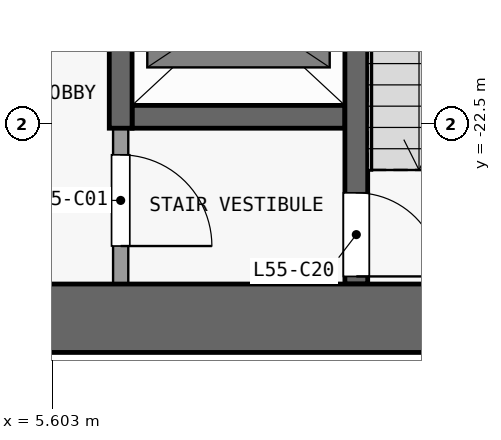
"""IFC4 building model, lengths in metres.
Left out: names, types, materials, properties, quantities, classifications, styles, units other than length and angle.
Written with IfcOpenShell. Run it as: python <this file> out.ifc"""

import sys

from ifc_helpers import new_model, si_unit, direction, frame, frame_2d, origin, place, context, subcontext, project, spatial, rectangle, extrude, element, fill, save


model = new_model("IFC4")
c1 = context("Model", 3, precision=1e-05, world=origin(), true_north=direction((0.0, 1.0)))
c2 = subcontext(c1, "Body", "Model", "MODEL_VIEW")
j1 = project(units=[si_unit("LENGTHUNIT", "METRE"), si_unit("PLANEANGLEUNIT", "RADIAN")], contexts=[c1])
p1 = place(None, origin())
s1 = spatial("IfcSite", under=j1, at=p1, CompositionType="ELEMENT")
p2 = place(p1, origin())
s2 = spatial("IfcBuilding", under=s1, at=p2, CompositionType="ELEMENT")
p3 = place(p2, frame((0.0, 0.0, 219.5)))
s3 = spatial("IfcBuildingStorey", under=s2, at=p3, CompositionType="ELEMENT", Elevation=219.5)
p4 = place(p3, frame((-13.2, -25.05, 0.0), z_axis=(0.0, 0.0, 1.0), x_axis=(1.0, 0.0, 0.0)))
e1 = element("IfcWall", 1, at=p4, inside=s3, PredefinedType="SHEAR", context=c2, shape_type="SweptSolid", body=[
    extrude(rectangle(XDim=26.4, YDim=0.9, at=frame_2d((13.2, 0.0))), origin(), (0.0, 0.0, 1.0), 3.3),
])
p5 = place(p3, frame((6.65, -22.4, 0.0), z_axis=(0.0, 0.0, 1.0), x_axis=(1.0, 0.0, 0.0)))
e2 = element("IfcWall", 2, at=p5, inside=s3, PredefinedType="SHEAR", context=c2, shape_type="SweptSolid", body=[
    extrude(rectangle(XDim=2.8, YDim=0.3, at=frame_2d((1.4, 0.0))), origin(), (0.0, 0.0, 1.0), 3.3),
])
p6 = place(p3, frame((6.5, -22.55, 0.0), z_axis=(0.0, 0.0, 1.0), x_axis=(0.0, -1.0, 0.0)))
e3 = element("IfcWall", 3, at=p6, inside=s3, PredefinedType="PARTITIONING", context=c2, shape_type="SweptSolid", body=[
    extrude(rectangle(XDim=2.05, YDim=0.2, at=frame_2d((1.025, 0.0))), origin(), (0.0, 0.0, 1.0), 3.3),
])
p7 = place(p6, frame((0.35, 0.0, 0.0)))
e4 = element("IfcOpeningElement", 4, at=p7, cuts=e3, PredefinedType="OPENING", context=c2, shape_type="SweptSolid", body=[
    extrude(rectangle(XDim=1.2, YDim=2.1, at=frame_2d((0.6, 1.05))), frame((0.0, 0.11, 0.0), z_axis=(0.0, -1.0, 0.0), x_axis=(1.0, 0.0, 0.0)), (0.0, 0.0, 1.0), 0.22),
])
p8 = place(p3, frame((6.5, -22.55, 0.0), z_axis=(0.0, 0.0, 1.0), x_axis=(0.0, 1.0, 0.0)))
e5 = element("IfcWall", 5, at=p8, inside=s3, PredefinedType="SHEAR", context=c2, shape_type="SweptSolid", body=[
    extrude(rectangle(XDim=14.05, YDim=0.3, at=frame_2d((7.025, 0.0))), origin(), (0.0, 0.0, 1.0), 3.3),
])
p9 = place(p8, frame((1.05, 0.0, 0.0)))
e6 = element("IfcOpeningElement", 6, at=p9, cuts=e5, PredefinedType="OPENING", context=c2, shape_type="SweptSolid", body=[
    extrude(rectangle(XDim=1.1, YDim=2.1, at=frame_2d((0.55, 1.05))), frame((0.0, 0.16, 0.0), z_axis=(0.0, -1.0, 0.0), x_axis=(1.0, 0.0, 0.0)), (0.0, 0.0, 1.0), 0.32),
])
p10 = place(p8, frame((3.875, 0.0, 0.0)))
e7 = element("IfcOpeningElement", 7, at=p10, cuts=e5, PredefinedType="OPENING", context=c2, shape_type="SweptSolid", body=[
    extrude(rectangle(XDim=1.1, YDim=2.1, at=frame_2d((0.55, 1.05))), frame((0.0, 0.16, 0.0), z_axis=(0.0, -1.0, 0.0), x_axis=(1.0, 0.0, 0.0)), (0.0, 0.0, 1.0), 0.32),
])
p11 = place(p8, frame((6.625, 0.0, 0.0)))
e8 = element("IfcOpeningElement", 8, at=p11, cuts=e5, PredefinedType="OPENING", context=c2, shape_type="SweptSolid", body=[
    extrude(rectangle(XDim=1.1, YDim=2.1, at=frame_2d((0.55, 1.05))), frame((0.0, 0.16, 0.0), z_axis=(0.0, -1.0, 0.0), x_axis=(1.0, 0.0, 0.0)), (0.0, 0.0, 1.0), 0.32),
])
p12 = place(p8, frame((9.375, 0.0, 0.0)))
e9 = element("IfcOpeningElement", 9, at=p12, cuts=e5, PredefinedType="OPENING", context=c2, shape_type="SweptSolid", body=[
    extrude(rectangle(XDim=1.1, YDim=2.1, at=frame_2d((0.55, 1.05))), frame((0.0, 0.16, 0.0), z_axis=(0.0, -1.0, 0.0), x_axis=(1.0, 0.0, 0.0)), (0.0, 0.0, 1.0), 0.32),
])
p13 = place(p8, frame((12.125, 0.0, 0.0)))
e10 = element("IfcOpeningElement", 10, at=p13, cuts=e5, PredefinedType="OPENING", context=c2, shape_type="SweptSolid", body=[
    extrude(rectangle(XDim=1.1, YDim=2.1, at=frame_2d((0.55, 1.05))), frame((0.0, 0.16, 0.0), z_axis=(0.0, -1.0, 0.0), x_axis=(1.0, 0.0, 0.0)), (0.0, 0.0, 1.0), 0.32),
])
p14 = place(p3, frame((9.6, -16.9, 0.0), z_axis=(0.0, 0.0, 1.0), x_axis=(0.0, -1.0, 0.0)))
e11 = element("IfcWall", 11, at=p14, inside=s3, PredefinedType="SHEAR", context=c2, shape_type="SweptSolid", body=[
    extrude(rectangle(XDim=7.7, YDim=0.3, at=frame_2d((3.85, 0.0))), origin(), (0.0, 0.0, 1.0), 3.3),
])
p15 = place(p14, frame((6.5, 0.0, 0.0)))
e12 = element("IfcOpeningElement", 12, at=p15, cuts=e11, PredefinedType="OPENING", context=c2, shape_type="SweptSolid", body=[
    extrude(rectangle(XDim=1.1, YDim=2.1, at=frame_2d((0.55, 1.05))), frame((0.0, 0.16, 0.0), z_axis=(0.0, -1.0, 0.0), x_axis=(1.0, 0.0, 0.0)), (0.0, 0.0, 1.0), 0.32),
])
p16 = place(p7, origin())
e13 = element("IfcDoor", 13, at=p16, inside=s3, OperationType="SINGLE_SWING_RIGHT", PredefinedType="DOOR", context=c2, shape_type="SweptSolid", body=[
    extrude(rectangle(XDim=1.2, YDim=2.1, at=frame_2d((0.6, 1.05))), frame((0.0, 0.025, 0.0), z_axis=(0.0, -1.0, 0.0), x_axis=(1.0, 0.0, 0.0)), (0.0, 0.0, 1.0), 0.05),
])
fill(e4, e13)
p17 = place(p15, origin())
e14 = element("IfcDoor", 14, at=p17, inside=s3, OperationType="SINGLE_SWING_RIGHT", PredefinedType="DOOR", context=c2, shape_type="SweptSolid", body=[
    extrude(rectangle(XDim=1.1, YDim=2.1, at=frame_2d((0.55, 1.05))), frame((0.0, 0.025, 0.0), z_axis=(0.0, -1.0, 0.0), x_axis=(1.0, 0.0, 0.0)), (0.0, 0.0, 1.0), 0.05),
])
fill(e12, e14)
save(model, sys.argv[1])
